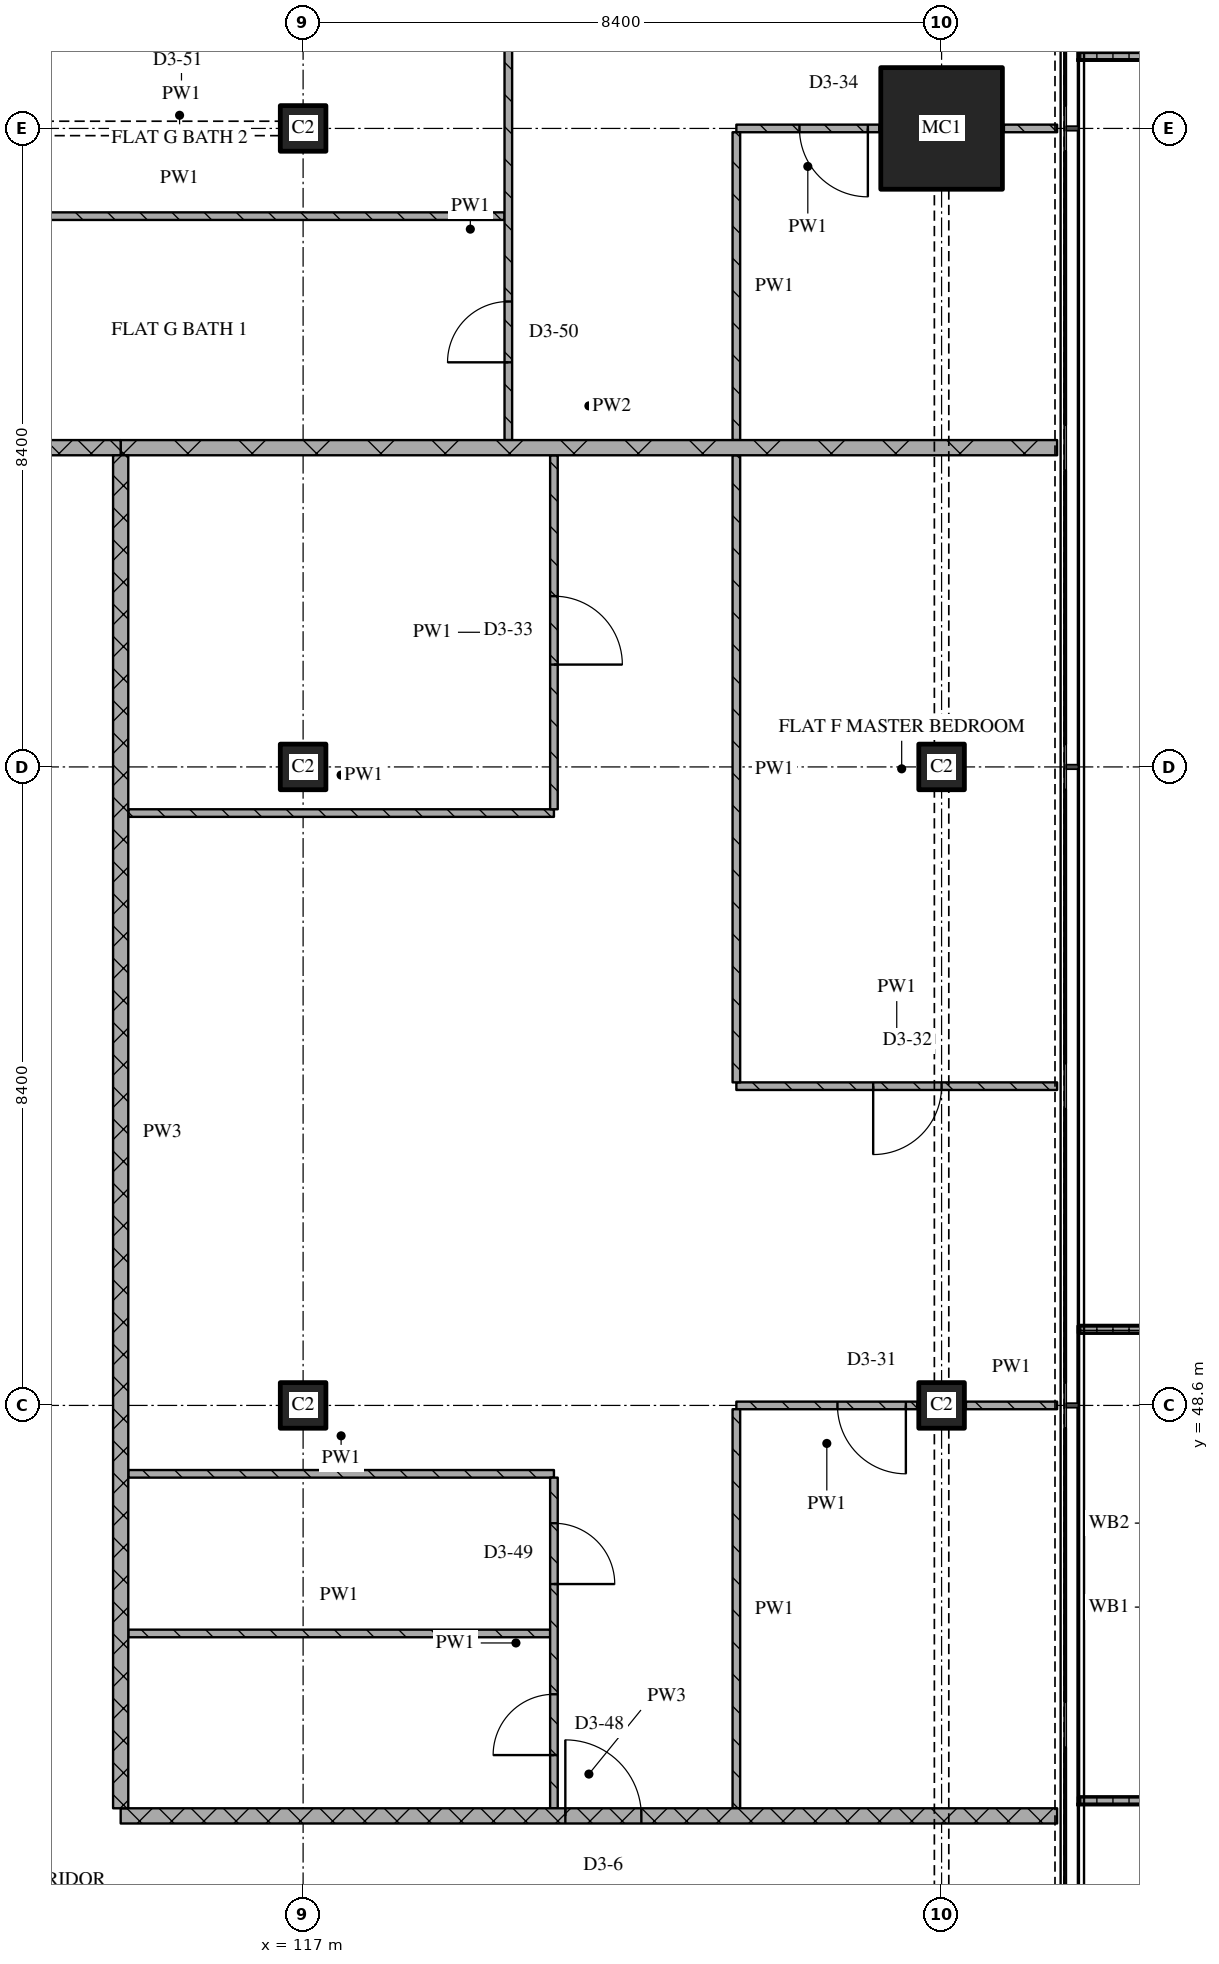
"""IFC4 building model, lengths in metres.
Left out: names, types, materials, properties, quantities, classifications, styles, units other than length and angle.
Written with IfcOpenShell. Run it as: python <this file> out.ifc"""

import sys

from ifc_helpers import new_model, si_unit, direction, frame, frame_2d, origin, origin_2d, place, context, subcontext, project, spatial, polyline, rectangle, outline, extrude, element, fill, save


model = new_model("IFC4")
c1 = context("Model", 3, precision=1e-05, world=origin(), true_north=direction((0.0, 1.0)))
c2 = subcontext(c1, "Body", "Model", "MODEL_VIEW")
j1 = project(units=[si_unit("LENGTHUNIT", "METRE"), si_unit("PLANEANGLEUNIT", "RADIAN")], contexts=[c1])
p1 = place(None, origin())
s1 = spatial("IfcSite", under=j1, at=p1, CompositionType="ELEMENT")
p2 = place(p1, origin())
s2 = spatial("IfcBuilding", under=s1, at=p2, CompositionType="ELEMENT")
p3 = place(p2, frame((0.0, 0.0, 230.7)))
s3 = spatial("IfcBuildingStorey", under=s2, at=p3, CompositionType="ELEMENT", Elevation=230.7)
for number, where, z_axis, x_axis in (
    (1, (117.0, 48.6, 0.0), (0.0, 0.0, 1.0), (1.0, 0.0, 0.0)),
    (2, (117.0, 57.0, 0.0), (0.0, 0.0, 1.0), (1.0, 0.0, 0.0)),
    (3, (117.0, 65.4, 0.0), (0.0, 0.0, 1.0), (1.0, 0.0, 0.0)),
    (4, (125.4, 48.6, 0.0), (0.0, 0.0, 1.0), (1.0, 0.0, 0.0)),
    (5, (125.4, 57.0, 0.0), (0.0, 0.0, 1.0), (1.0, 0.0, 0.0)),
):
    element("IfcColumn", number, at=place(p3, frame(where, z_axis=z_axis, x_axis=x_axis)), inside=s3, PredefinedType="COLUMN", context=c2, shape_type="SweptSolid", body=[
        extrude(rectangle(XDim=0.6, YDim=0.6, at=origin_2d()), origin(), (0.0, 0.0, 1.0), 3.6),
    ])
p4 = place(p3, frame((125.4, 65.4, 0.0), z_axis=(0.0, 0.0, 1.0), x_axis=(1.0, 0.0, 0.0)))
e6 = element("IfcColumn", 6, at=p4, inside=s3, PredefinedType="COLUMN", context=c2, shape_type="SweptSolid", body=[
    extrude(rectangle(XDim=1.6, YDim=1.6, at=origin_2d()), origin(), (0.0, 0.0, 1.0), 3.6),
])
p5 = place(p3, origin())
e7 = element("IfcWall", 7, at=p5, inside=s3, PredefinedType="SOLIDWALL", context=c2, shape_type="SweptSolid", body=[
    extrude(outline(polyline([(127.2, 43.35), (127.2, 43.45), (128.967, 43.45), (128.967, 49.55), (127.2, 49.55), (127.2, 49.65), (129.067, 49.65), (129.067, 43.35), (127.2, 43.35)])), origin(), (0.0, 0.0, 1.0), 1.0),
])
p6 = place(p3, origin())
e8 = element("IfcWall", 8, at=p6, inside=s3, PredefinedType="SOLIDWALL", context=c2, shape_type="SweptSolid", body=[
    extrude(outline(polyline([(127.2, 66.3), (127.2, 66.4), (128.7, 66.4), (128.7, 68.6), (127.2, 68.6), (127.2, 68.7), (128.8, 68.7), (128.8, 66.3), (127.2, 66.3)])), origin(), (0.0, 0.0, 1.0), 1.0),
])
p7 = place(p3, frame((114.6, 43.2, 0.0), z_axis=(0.0, 0.0, 1.0), x_axis=(1.0, 0.0, 0.0)))
e9 = element("IfcWall", 9, at=p7, inside=s3, PredefinedType="PARTITIONING", context=c2, shape_type="SweptSolid", body=[
    extrude(rectangle(XDim=12.32, YDim=0.2, at=frame_2d((6.16, 0.0))), origin(), (0.0, 0.0, 1.0), 3.32),
])
p8 = place(p7, frame((5.85, 0.0, 0.0)))
e10 = element("IfcOpeningElement", 10, at=p8, cuts=e9, PredefinedType="OPENING", context=c2, shape_type="SweptSolid", body=[
    extrude(rectangle(XDim=1.0, YDim=2.1, at=frame_2d((0.5, 1.05))), frame((0.0, 0.11, 0.0), z_axis=(0.0, -1.0, 0.0), x_axis=(1.0, 0.0, 0.0)), (0.0, 0.0, 1.0), 0.22),
])
p9 = place(p3, frame((114.7, 45.6, 0.0), z_axis=(0.0, 0.0, 1.0), x_axis=(1.0, 0.0, 0.0)))
e11 = element("IfcWall", 11, at=p9, inside=s3, PredefinedType="PARTITIONING", context=c2, shape_type="SweptSolid", body=[
    extrude(rectangle(XDim=5.55, YDim=0.1, at=frame_2d((2.775, 0.0))), origin(), (0.0, 0.0, 1.0), 3.32),
])
p10 = place(p3, frame((114.7, 47.7, 0.0), z_axis=(0.0, 0.0, 1.0), x_axis=(1.0, 0.0, 0.0)))
e12 = element("IfcWall", 12, at=p10, inside=s3, PredefinedType="PARTITIONING", context=c2, shape_type="SweptSolid", body=[
    extrude(rectangle(XDim=5.6, YDim=0.1, at=frame_2d((2.8, 0.0))), origin(), (0.0, 0.0, 1.0), 3.32),
])
p11 = place(p3, frame((125.08, 48.6, 0.0), z_axis=(0.0, 0.0, 1.0), x_axis=(-1.0, 0.0, 0.0)))
e13 = element("IfcWall", 13, at=p11, inside=s3, PredefinedType="PARTITIONING", context=c2, shape_type="SweptSolid", body=[
    extrude(rectangle(XDim=2.38, YDim=0.1, at=frame_2d((1.19, 0.0))), origin(), (0.0, 0.0, 1.0), 3.32),
])
p12 = place(p11, frame((0.15, 0.0, 0.0)))
e14 = element("IfcOpeningElement", 14, at=p12, cuts=e13, PredefinedType="OPENING", context=c2, shape_type="SweptSolid", body=[
    extrude(rectangle(XDim=0.9, YDim=2.1, at=frame_2d((0.45, 1.05))), frame((0.0, 0.06, 0.0), z_axis=(0.0, -1.0, 0.0), x_axis=(1.0, 0.0, 0.0)), (0.0, 0.0, 1.0), 0.12),
])
p13 = place(p3, frame((125.72, 48.6, 0.0), z_axis=(0.0, 0.0, 1.0), x_axis=(1.0, 0.0, 0.0)))
e15 = element("IfcWall", 15, at=p13, inside=s3, PredefinedType="PARTITIONING", context=c2, shape_type="SweptSolid", body=[
    extrude(rectangle(XDim=1.2, YDim=0.1, at=frame_2d((0.6, 0.0))), origin(), (0.0, 0.0, 1.0), 3.32),
])
p14 = place(p3, frame((122.7, 52.8, 0.0), z_axis=(0.0, 0.0, 1.0), x_axis=(1.0, 0.0, 0.0)))
e16 = element("IfcWall", 16, at=p14, inside=s3, PredefinedType="PARTITIONING", context=c2, shape_type="SweptSolid", body=[
    extrude(rectangle(XDim=4.22, YDim=0.1, at=frame_2d((2.11, 0.0))), origin(), (0.0, 0.0, 1.0), 3.32),
])
p15 = place(p14, frame((1.8, 0.0, 0.0)))
e17 = element("IfcOpeningElement", 17, at=p15, cuts=e16, PredefinedType="OPENING", context=c2, shape_type="SweptSolid", body=[
    extrude(rectangle(XDim=0.9, YDim=2.1, at=frame_2d((0.45, 1.05))), frame((0.0, 0.06, 0.0), z_axis=(0.0, -1.0, 0.0), x_axis=(1.0, 0.0, 0.0)), (0.0, 0.0, 1.0), 0.12),
])
p16 = place(p3, frame((114.7, 56.393, 0.0), z_axis=(0.0, 0.0, 1.0), x_axis=(1.0, 0.0, 0.0)))
e18 = element("IfcWall", 18, at=p16, inside=s3, PredefinedType="PARTITIONING", context=c2, shape_type="SweptSolid", body=[
    extrude(rectangle(XDim=5.6, YDim=0.1, at=frame_2d((2.8, 0.0))), origin(), (0.0, 0.0, 1.0), 3.32),
])
p17 = place(p3, frame((111.0, 61.2, 0.0), z_axis=(0.0, 0.0, 1.0), x_axis=(1.0, 0.0, 0.0)))
e19 = element("IfcWall", 19, at=p17, inside=s3, PredefinedType="PARTITIONING", context=c2, shape_type="SweptSolid", body=[
    extrude(rectangle(XDim=3.6, YDim=0.2, at=frame_2d((1.8, 0.0))), origin(), (0.0, 0.0, 1.0), 3.32),
])
p18 = place(p3, frame((114.6, 61.2, 0.0), z_axis=(0.0, 0.0, 1.0), x_axis=(1.0, 0.0, 0.0)))
e20 = element("IfcWall", 20, at=p18, inside=s3, PredefinedType="PARTITIONING", context=c2, shape_type="SweptSolid", body=[
    extrude(rectangle(XDim=12.32, YDim=0.2, at=frame_2d((6.16, 0.0))), origin(), (0.0, 0.0, 1.0), 3.32),
])
p19 = place(p3, frame((111.1, 64.246, 0.0), z_axis=(0.0, 0.0, 1.0), x_axis=(1.0, 0.0, 0.0)))
e21 = element("IfcWall", 21, at=p19, inside=s3, PredefinedType="PARTITIONING", context=c2, shape_type="SweptSolid", body=[
    extrude(rectangle(XDim=8.55, YDim=0.1, at=frame_2d((4.275, 0.0))), origin(), (0.0, 0.0, 1.0), 3.32),
])
p20 = place(p3, frame((124.58, 65.4, 0.0), z_axis=(0.0, 0.0, 1.0), x_axis=(-1.0, 0.0, 0.0)))
e22 = element("IfcWall", 22, at=p20, inside=s3, PredefinedType="PARTITIONING", context=c2, shape_type="SweptSolid", body=[
    extrude(rectangle(XDim=1.88, YDim=0.1, at=frame_2d((0.94, 0.0))), origin(), (0.0, 0.0, 1.0), 3.32),
])
p21 = place(p20, frame((0.15, 0.0, 0.0)))
e23 = element("IfcOpeningElement", 23, at=p21, cuts=e22, PredefinedType="OPENING", context=c2, shape_type="SweptSolid", body=[
    extrude(rectangle(XDim=0.9, YDim=2.1, at=frame_2d((0.45, 1.05))), frame((0.0, 0.06, 0.0), z_axis=(0.0, -1.0, 0.0), x_axis=(1.0, 0.0, 0.0)), (0.0, 0.0, 1.0), 0.12),
])
p22 = place(p3, frame((126.22, 65.4, 0.0), z_axis=(0.0, 0.0, 1.0), x_axis=(1.0, 0.0, 0.0)))
e24 = element("IfcWall", 24, at=p22, inside=s3, PredefinedType="PARTITIONING", context=c2, shape_type="SweptSolid", body=[
    extrude(rectangle(XDim=0.7, YDim=0.1, at=frame_2d((0.35, 0.0))), origin(), (0.0, 0.0, 1.0), 3.32),
])
p23 = place(p3, frame((114.6, 61.1, 0.0), z_axis=(0.0, 0.0, 1.0), x_axis=(0.0, -1.0, 0.0)))
e25 = element("IfcWall", 25, at=p23, inside=s3, PredefinedType="PARTITIONING", context=c2, shape_type="SweptSolid", body=[
    extrude(rectangle(XDim=17.8, YDim=0.2, at=frame_2d((8.9, 0.0))), origin(), (0.0, 0.0, 1.0), 3.32),
])
p24 = place(p3, frame((119.7, 61.3, 0.0), z_axis=(0.0, 0.0, 1.0), x_axis=(0.0, 1.0, 0.0)))
e26 = element("IfcWall", 26, at=p24, inside=s3, PredefinedType="PARTITIONING", context=c2, shape_type="SweptSolid", body=[
    extrude(rectangle(XDim=5.55, YDim=0.1, at=frame_2d((2.775, 0.0))), origin(), (0.0, 0.0, 1.0), 3.32),
])
p25 = place(p24, frame((1.023, 0.0, 0.0)))
e27 = element("IfcOpeningElement", 27, at=p25, cuts=e26, PredefinedType="OPENING", context=c2, shape_type="SweptSolid", body=[
    extrude(rectangle(XDim=0.8, YDim=2.1, at=frame_2d((0.4, 1.05))), frame((0.0, 0.06, 0.0), z_axis=(0.0, -1.0, 0.0), x_axis=(1.0, 0.0, 0.0)), (0.0, 0.0, 1.0), 0.12),
])
p26 = place(p3, frame((120.3, 43.3, 0.0), z_axis=(0.0, 0.0, 1.0), x_axis=(0.0, 1.0, 0.0)))
e28 = element("IfcWall", 28, at=p26, inside=s3, PredefinedType="PARTITIONING", context=c2, shape_type="SweptSolid", body=[
    extrude(rectangle(XDim=4.35, YDim=0.1, at=frame_2d((2.175, 0.0))), origin(), (0.0, 0.0, 1.0), 3.32),
])
p27 = place(p26, frame((0.7, 0.0, 0.0)))
e29 = element("IfcOpeningElement", 29, at=p27, cuts=e28, PredefinedType="OPENING", context=c2, shape_type="SweptSolid", body=[
    extrude(rectangle(XDim=0.8, YDim=2.1, at=frame_2d((0.4, 1.05))), frame((0.0, 0.06, 0.0), z_axis=(0.0, -1.0, 0.0), x_axis=(1.0, 0.0, 0.0)), (0.0, 0.0, 1.0), 0.12),
])
p28 = place(p26, frame((2.95, 0.0, 0.0)))
e30 = element("IfcOpeningElement", 30, at=p28, cuts=e28, PredefinedType="OPENING", context=c2, shape_type="SweptSolid", body=[
    extrude(rectangle(XDim=0.8, YDim=2.1, at=frame_2d((0.4, 1.05))), frame((0.0, 0.06, 0.0), z_axis=(0.0, -1.0, 0.0), x_axis=(1.0, 0.0, 0.0)), (0.0, 0.0, 1.0), 0.12),
])
p29 = place(p3, frame((120.3, 56.443, 0.0), z_axis=(0.0, 0.0, 1.0), x_axis=(0.0, 1.0, 0.0)))
e31 = element("IfcWall", 31, at=p29, inside=s3, PredefinedType="PARTITIONING", context=c2, shape_type="SweptSolid", body=[
    extrude(rectangle(XDim=4.657, YDim=0.1, at=frame_2d((2.329, 0.0))), origin(), (0.0, 0.0, 1.0), 3.32),
])
p30 = place(p29, frame((1.904, 0.0, 0.0)))
e32 = element("IfcOpeningElement", 32, at=p30, cuts=e31, PredefinedType="OPENING", context=c2, shape_type="SweptSolid", body=[
    extrude(rectangle(XDim=0.9, YDim=2.1, at=frame_2d((0.45, 1.05))), frame((0.0, 0.06, 0.0), z_axis=(0.0, -1.0, 0.0), x_axis=(1.0, 0.0, 0.0)), (0.0, 0.0, 1.0), 0.12),
])
p31 = place(p3, frame((122.7, 48.55, 0.0), z_axis=(0.0, 0.0, 1.0), x_axis=(0.0, -1.0, 0.0)))
e33 = element("IfcWall", 33, at=p31, inside=s3, PredefinedType="PARTITIONING", context=c2, shape_type="SweptSolid", body=[
    extrude(rectangle(XDim=5.25, YDim=0.1, at=frame_2d((2.625, 0.0))), origin(), (0.0, 0.0, 1.0), 3.32),
])
p32 = place(p3, frame((122.7, 61.1, 0.0), z_axis=(0.0, 0.0, 1.0), x_axis=(0.0, -1.0, 0.0)))
e34 = element("IfcWall", 34, at=p32, inside=s3, PredefinedType="PARTITIONING", context=c2, shape_type="SweptSolid", body=[
    extrude(rectangle(XDim=8.25, YDim=0.1, at=frame_2d((4.125, 0.0))), origin(), (0.0, 0.0, 1.0), 3.32),
])
p33 = place(p3, frame((122.7, 65.35, 0.0), z_axis=(0.0, 0.0, 1.0), x_axis=(0.0, -1.0, 0.0)))
e35 = element("IfcWall", 35, at=p33, inside=s3, PredefinedType="PARTITIONING", context=c2, shape_type="SweptSolid", body=[
    extrude(rectangle(XDim=4.05, YDim=0.1, at=frame_2d((2.025, 0.0))), origin(), (0.0, 0.0, 1.0), 3.32),
])
p34 = place(p8, origin())
e36 = element("IfcDoor", 36, at=p34, inside=s3, OperationType="SINGLE_SWING_LEFT", PredefinedType="DOOR", context=c2, shape_type="SweptSolid", body=[
    extrude(rectangle(XDim=1.0, YDim=2.1, at=frame_2d((0.5, 1.05))), frame((0.0, 0.025, 0.0), z_axis=(0.0, -1.0, 0.0), x_axis=(1.0, 0.0, 0.0)), (0.0, 0.0, 1.0), 0.05),
])
fill(e10, e36)
p35 = place(p12, origin())
e37 = element("IfcDoor", 37, at=p35, inside=s3, OperationType="SINGLE_SWING_LEFT", PredefinedType="DOOR", context=c2, shape_type="SweptSolid", body=[
    extrude(rectangle(XDim=0.9, YDim=2.1, at=frame_2d((0.45, 1.05))), frame((0.0, 0.025, 0.0), z_axis=(0.0, -1.0, 0.0), x_axis=(1.0, 0.0, 0.0)), (0.0, 0.0, 1.0), 0.05),
])
fill(e14, e37)
p36 = place(p15, origin())
e38 = element("IfcDoor", 38, at=p36, inside=s3, OperationType="SINGLE_SWING_RIGHT", PredefinedType="DOOR", context=c2, shape_type="SweptSolid", body=[
    extrude(rectangle(XDim=0.9, YDim=2.1, at=frame_2d((0.45, 1.05))), frame((0.0, 0.025, 0.0), z_axis=(0.0, -1.0, 0.0), x_axis=(1.0, 0.0, 0.0)), (0.0, 0.0, 1.0), 0.05),
])
fill(e17, e38)
p37 = place(p21, origin())
e39 = element("IfcDoor", 39, at=p37, inside=s3, OperationType="SINGLE_SWING_LEFT", PredefinedType="DOOR", context=c2, shape_type="SweptSolid", body=[
    extrude(rectangle(XDim=0.9, YDim=2.1, at=frame_2d((0.45, 1.05))), frame((0.0, 0.025, 0.0), z_axis=(0.0, -1.0, 0.0), x_axis=(1.0, 0.0, 0.0)), (0.0, 0.0, 1.0), 0.05),
])
fill(e23, e39)
p38 = place(p25, origin())
e40 = element("IfcDoor", 40, at=p38, inside=s3, OperationType="SINGLE_SWING_LEFT", PredefinedType="DOOR", context=c2, shape_type="SweptSolid", body=[
    extrude(rectangle(XDim=0.8, YDim=2.1, at=frame_2d((0.4, 1.05))), frame((0.0, 0.025, 0.0), z_axis=(0.0, -1.0, 0.0), x_axis=(1.0, 0.0, 0.0)), (0.0, 0.0, 1.0), 0.05),
])
fill(e27, e40)
p39 = place(p27, origin())
e41 = element("IfcDoor", 41, at=p39, inside=s3, OperationType="SINGLE_SWING_LEFT", PredefinedType="DOOR", context=c2, shape_type="SweptSolid", body=[
    extrude(rectangle(XDim=0.8, YDim=2.1, at=frame_2d((0.4, 1.05))), frame((0.0, 0.025, 0.0), z_axis=(0.0, -1.0, 0.0), x_axis=(1.0, 0.0, 0.0)), (0.0, 0.0, 1.0), 0.05),
])
fill(e29, e41)
p40 = place(p28, origin())
e42 = element("IfcDoor", 42, at=p40, inside=s3, OperationType="SINGLE_SWING_RIGHT", PredefinedType="DOOR", context=c2, shape_type="SweptSolid", body=[
    extrude(rectangle(XDim=0.8, YDim=2.1, at=frame_2d((0.4, 1.05))), frame((0.0, 0.025, 0.0), z_axis=(0.0, -1.0, 0.0), x_axis=(1.0, 0.0, 0.0)), (0.0, 0.0, 1.0), 0.05),
])
fill(e30, e42)
p41 = place(p30, origin())
e43 = element("IfcDoor", 43, at=p41, inside=s3, OperationType="SINGLE_SWING_RIGHT", PredefinedType="DOOR", context=c2, shape_type="SweptSolid", body=[
    extrude(rectangle(XDim=0.9, YDim=2.1, at=frame_2d((0.45, 1.05))), frame((0.0, 0.025, 0.0), z_axis=(0.0, -1.0, 0.0), x_axis=(1.0, 0.0, 0.0)), (0.0, 0.0, 1.0), 0.05),
])
fill(e32, e43)
save(model, sys.argv[1])
